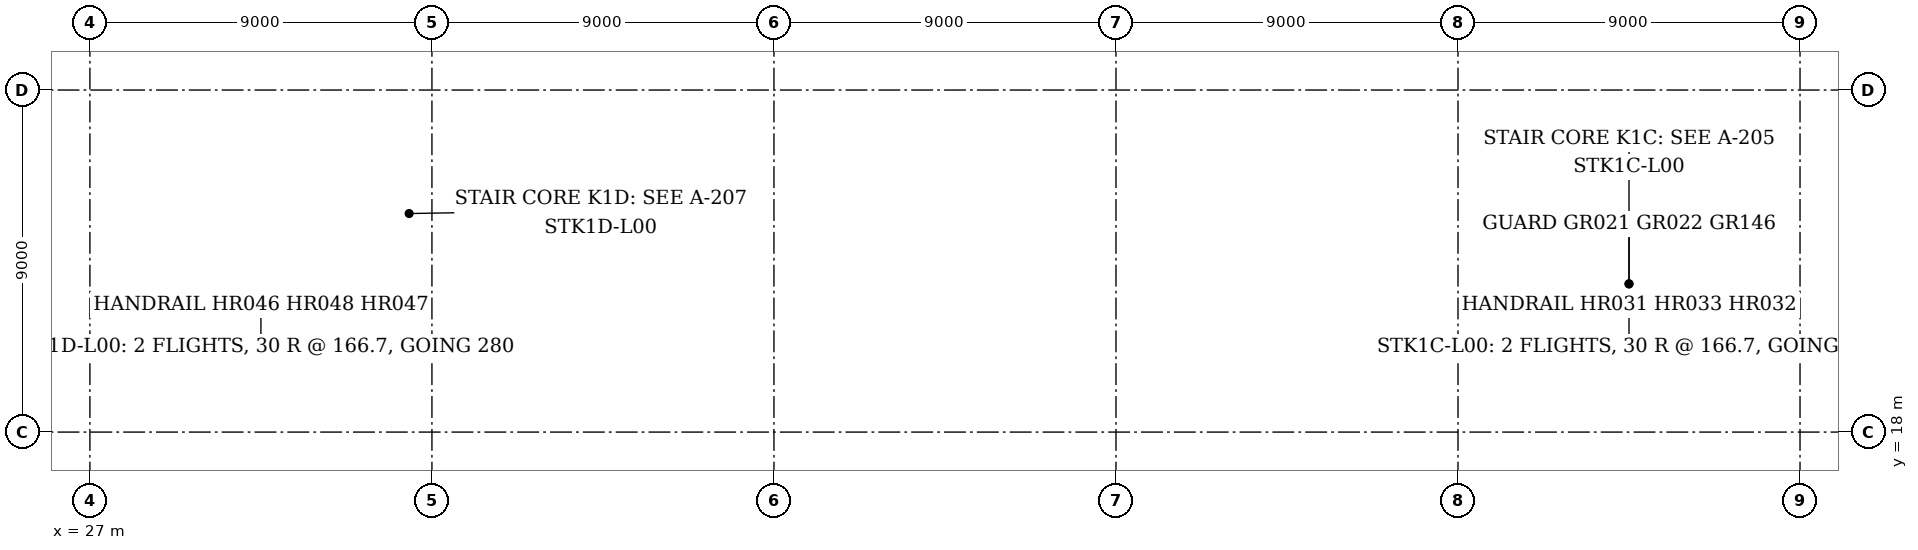
"""IFC4 building model, lengths in metres.
Left out: names, types, materials, properties, quantities, classifications, styles, units other than length and angle.
Written with IfcOpenShell. Run it as: python <this file> out.ifc"""

import sys

from ifc_helpers import new_model, si_unit, direction, frame, frame_2d, origin, origin_2d, place, context, subcontext, project, spatial, rectangle, hollow_rectangle, i_section, extrude, element, fill, save


model = new_model("IFC4")
c1 = context("Model", 3, precision=1e-05, world=origin(), true_north=direction((0.0, 1.0)))
c2 = subcontext(c1, "Body", "Model", "MODEL_VIEW")
j1 = project(units=[si_unit("LENGTHUNIT", "METRE"), si_unit("PLANEANGLEUNIT", "RADIAN")], contexts=[c1])
p1 = place(None, origin())
s1 = spatial("IfcSite", under=j1, at=p1, CompositionType="ELEMENT")
p2 = place(p1, origin())
s2 = spatial("IfcBuilding", under=s1, at=p2, CompositionType="ELEMENT")
p3 = place(p2, origin())
s3 = spatial("IfcBuildingStorey", under=s2, at=p3, CompositionType="ELEMENT", Elevation=0.0)
p4 = place(p3, frame((45.0, 18.0, 0.0), z_axis=(0.0, 0.0, 1.0), x_axis=(1.0, 0.0, 0.0)))
e1 = element("IfcColumn", 1, at=p4, inside=s3, PredefinedType="COLUMN", context=c2, shape_type="SweptSolid", body=[
    extrude(hollow_rectangle(XDim=0.3, YDim=0.3, WallThickness=0.016, InnerFilletRadius=0.024, OuterFilletRadius=0.04, at=origin_2d()), origin(), (0.0, 0.0, 1.0), 5.0),
])
p5 = place(p3, frame((54.0, 18.0, 0.0), z_axis=(0.0, 0.0, 1.0), x_axis=(1.0, 0.0, 0.0)))
e2 = element("IfcColumn", 2, at=p5, inside=s3, PredefinedType="COLUMN", context=c2, shape_type="SweptSolid", body=[
    extrude(i_section(OverallWidth=0.5, OverallDepth=0.48, WebThickness=0.04, FlangeThickness=0.04, at=origin_2d()), origin(), (0.0, 0.0, 1.0), 5.0),
])
p6 = place(p3, frame((27.0, 27.0, 0.0), z_axis=(0.0, 0.0, 1.0), x_axis=(1.0, 0.0, 0.0)))
e3 = element("IfcColumn", 3, at=p6, inside=s3, PredefinedType="COLUMN", context=c2, shape_type="SweptSolid", body=[
    extrude(hollow_rectangle(XDim=0.3, YDim=0.3, WallThickness=0.016, InnerFilletRadius=0.024, OuterFilletRadius=0.04, at=origin_2d()), origin(), (0.0, 0.0, 1.0), 5.0),
])
p7 = place(p3, frame((36.0, 27.0, 0.0), z_axis=(0.0, 0.0, 1.0), x_axis=(1.0, 0.0, 0.0)))
e4 = element("IfcColumn", 4, at=p7, inside=s3, PredefinedType="COLUMN", context=c2, shape_type="SweptSolid", body=[
    extrude(i_section(OverallWidth=0.5, OverallDepth=0.48, WebThickness=0.04, FlangeThickness=0.04, at=origin_2d()), origin(), (0.0, 0.0, 1.0), 5.0),
])
p8 = place(p3, frame((45.0, 27.0, 0.0), z_axis=(0.0, 0.0, 1.0), x_axis=(1.0, 0.0, 0.0)))
e5 = element("IfcColumn", 5, at=p8, inside=s3, PredefinedType="COLUMN", context=c2, shape_type="SweptSolid", body=[
    extrude(i_section(OverallWidth=0.309, OverallDepth=0.321, WebThickness=0.014, FlangeThickness=0.022, FilletRadius=0.017, at=origin_2d()), origin(), (0.0, 0.0, 1.0), 5.0),
])
p9 = place(p3, frame((54.0, 27.0, 0.0), z_axis=(0.0, 0.0, 1.0), x_axis=(1.0, 0.0, 0.0)))
e6 = element("IfcColumn", 6, at=p9, inside=s3, PredefinedType="COLUMN", context=c2, shape_type="SweptSolid", body=[
    extrude(i_section(OverallWidth=0.5, OverallDepth=0.48, WebThickness=0.04, FlangeThickness=0.04, at=origin_2d()), origin(), (0.0, 0.0, 1.0), 5.0),
])
for number, where, z_axis, x_axis in (
    (7, (63.0, 27.0, 0.0), (0.0, 0.0, 1.0), (1.0, 0.0, 0.0)),
    (8, (27.0, 18.0, 0.0), (0.0, 0.0, 1.0), (1.0, 0.0, 0.0)),
):
    element("IfcColumn", number, at=place(p3, frame(where, z_axis=z_axis, x_axis=x_axis)), inside=s3, PredefinedType="COLUMN", context=c2, shape_type="SweptSolid", body=[
        extrude(i_section(OverallWidth=0.311, OverallDepth=0.327, WebThickness=0.016, FlangeThickness=0.025, FilletRadius=0.017, at=origin_2d()), origin(), (0.0, 0.0, 1.0), 5.0),
    ])
p10 = place(p3, frame((72.1, 9.0, 0.0), z_axis=(0.0, 0.0, 1.0), x_axis=(0.0, 1.0, 0.0)))
e9 = element("IfcWall", 9, at=p10, inside=s3, PredefinedType="SOLIDWALL", context=c2, shape_type="SweptSolid", body=[
    extrude(rectangle(XDim=9.0, YDim=0.32, at=frame_2d((4.5, 0.0))), origin(), (0.0, 0.0, 1.0), 4.835),
])
p11 = place(p3, frame((27.09, 22.5, 0.0), z_axis=(0.0, 0.0, 1.0), x_axis=(0.0, 1.0, 0.0)))
e10 = element("IfcWall", 10, at=p11, inside=s3, PredefinedType="SOLIDWALL", context=c2, shape_type="SweptSolid", body=[
    extrude(rectangle(XDim=4.35, YDim=0.3, at=frame_2d((2.175, 0.0))), origin(), (0.0, 0.0, 1.0), 4.378),
])
p12 = place(p3, frame((46.6, 18.15, 0.0), z_axis=(0.0, 0.0, 1.0), x_axis=(1.0, 0.0, 0.0)))
e11 = element("IfcWall", 11, at=p12, inside=s3, PredefinedType="SOLIDWALL", context=c2, shape_type="SweptSolid", body=[
    extrude(rectangle(XDim=5.7, YDim=0.2, at=frame_2d((2.85, 0.0))), origin(), (0.0, 0.0, 1.0), 4.835),
])
p13 = place(p12, frame((0.3, 0.0, 0.0)))
e12 = element("IfcOpeningElement", 12, at=p13, cuts=e11, PredefinedType="OPENING", context=c2, shape_type="SweptSolid", body=[
    extrude(rectangle(XDim=2.4, YDim=2.4, at=frame_2d((1.2, 1.2))), frame((0.0, 0.11, 0.0), z_axis=(0.0, -1.0, 0.0), x_axis=(1.0, 0.0, 0.0)), (0.0, 0.0, 1.0), 0.22),
])
p14 = place(p12, frame((3.0, 0.0, 0.0)))
e13 = element("IfcOpeningElement", 13, at=p14, cuts=e11, PredefinedType="OPENING", context=c2, shape_type="SweptSolid", body=[
    extrude(rectangle(XDim=2.4, YDim=2.4, at=frame_2d((1.2, 1.2))), frame((0.0, 0.11, 0.0), z_axis=(0.0, -1.0, 0.0), x_axis=(1.0, 0.0, 0.0)), (0.0, 0.0, 1.0), 0.22),
])
p15 = place(p3, frame((63.0, 18.15, 0.0), z_axis=(0.0, 0.0, 1.0), x_axis=(1.0, 0.0, 0.0)))
e14 = element("IfcWall", 14, at=p15, inside=s3, PredefinedType="SOLIDWALL", context=c2, shape_type="SweptSolid", body=[
    extrude(rectangle(XDim=9.0, YDim=0.3, at=frame_2d((4.5, 0.0))), origin(), (0.0, 0.0, 1.0), 5.0),
])
p16 = place(p15, frame((3.65, 0.0, 0.0)))
e15 = element("IfcOpeningElement", 15, at=p16, cuts=e14, PredefinedType="OPENING", context=c2, shape_type="SweptSolid", body=[
    extrude(rectangle(XDim=1.8, YDim=2.1, at=frame_2d((0.9, 1.05))), frame((0.0, 0.16, 0.0), z_axis=(0.0, -1.0, 0.0), x_axis=(1.0, 0.0, 0.0)), (0.0, 0.0, 1.0), 0.32),
])
p17 = place(p3, frame((71.85, 18.3, 0.0), z_axis=(0.0, 0.0, 1.0), x_axis=(0.0, 1.0, 0.0)))
e16 = element("IfcWall", 16, at=p17, inside=s3, PredefinedType="SOLIDWALL", context=c2, shape_type="SweptSolid", body=[
    extrude(rectangle(XDim=3.9, YDim=0.3, at=frame_2d((1.95, 0.0))), origin(), (0.0, 0.0, 1.0), 5.0),
])
p18 = place(p3, frame((63.0, 22.35, 0.0), z_axis=(0.0, 0.0, 1.0), x_axis=(1.0, 0.0, 0.0)))
e17 = element("IfcWall", 17, at=p18, inside=s3, PredefinedType="SOLIDWALL", context=c2, shape_type="SweptSolid", body=[
    extrude(rectangle(XDim=9.0, YDim=0.3, at=frame_2d((4.5, 0.0))), origin(), (0.0, 0.0, 1.0), 5.0),
])
p19 = place(p3, frame((63.15, 18.3, 0.0), z_axis=(0.0, 0.0, 1.0), x_axis=(0.0, 1.0, 0.0)))
e18 = element("IfcWall", 18, at=p19, inside=s3, PredefinedType="SOLIDWALL", context=c2, shape_type="SweptSolid", body=[
    extrude(rectangle(XDim=3.9, YDim=0.3, at=frame_2d((1.95, 0.0))), origin(), (0.0, 0.0, 1.0), 5.0),
])
p20 = place(p19, frame((1.05, 0.0, 0.0)))
e19 = element("IfcOpeningElement", 19, at=p20, cuts=e18, PredefinedType="OPENING", context=c2, shape_type="SweptSolid", body=[
    extrude(rectangle(XDim=1.8, YDim=2.1, at=frame_2d((0.9, 1.05))), frame((0.0, 0.16, 0.0), z_axis=(0.0, -1.0, 0.0), x_axis=(1.0, 0.0, 0.0)), (0.0, 0.0, 1.0), 0.32),
])
p21 = place(p3, frame((27.0, 18.15, 0.0), z_axis=(0.0, 0.0, 1.0), x_axis=(1.0, 0.0, 0.0)))
e20 = element("IfcWall", 20, at=p21, inside=s3, PredefinedType="SOLIDWALL", context=c2, shape_type="SweptSolid", body=[
    extrude(rectangle(XDim=9.0, YDim=0.3, at=frame_2d((4.5, 0.0))), origin(), (0.0, 0.0, 1.0), 5.0),
])
p22 = place(p21, frame((3.55, 0.0, 0.0)))
e21 = element("IfcOpeningElement", 21, at=p22, cuts=e20, PredefinedType="OPENING", context=c2, shape_type="SweptSolid", body=[
    extrude(rectangle(XDim=1.8, YDim=2.1, at=frame_2d((0.9, 1.05))), frame((0.0, 0.16, 0.0), z_axis=(0.0, -1.0, 0.0), x_axis=(1.0, 0.0, 0.0)), (0.0, 0.0, 1.0), 0.32),
])
p23 = place(p3, frame((35.85, 18.3, 0.0), z_axis=(0.0, 0.0, 1.0), x_axis=(0.0, 1.0, 0.0)))
e22 = element("IfcWall", 22, at=p23, inside=s3, PredefinedType="SOLIDWALL", context=c2, shape_type="SweptSolid", body=[
    extrude(rectangle(XDim=3.9, YDim=0.3, at=frame_2d((1.95, 0.0))), origin(), (0.0, 0.0, 1.0), 5.0),
])
p24 = place(p23, frame((1.05, 0.0, 0.0)))
e23 = element("IfcOpeningElement", 23, at=p24, cuts=e22, PredefinedType="OPENING", context=c2, shape_type="SweptSolid", body=[
    extrude(rectangle(XDim=1.8, YDim=2.1, at=frame_2d((0.9, 1.05))), frame((0.0, 0.16, 0.0), z_axis=(0.0, -1.0, 0.0), x_axis=(1.0, 0.0, 0.0)), (0.0, 0.0, 1.0), 0.32),
])
p25 = place(p3, frame((27.0, 22.35, 0.0), z_axis=(0.0, 0.0, 1.0), x_axis=(1.0, 0.0, 0.0)))
e24 = element("IfcWall", 24, at=p25, inside=s3, PredefinedType="SOLIDWALL", context=c2, shape_type="SweptSolid", body=[
    extrude(rectangle(XDim=9.0, YDim=0.3, at=frame_2d((4.5, 0.0))), origin(), (0.0, 0.0, 1.0), 5.0),
])
p26 = place(p3, frame((27.15, 18.3, 0.0), z_axis=(0.0, 0.0, 1.0), x_axis=(0.0, 1.0, 0.0)))
e25 = element("IfcWall", 25, at=p26, inside=s3, PredefinedType="SOLIDWALL", context=c2, shape_type="SweptSolid", body=[
    extrude(rectangle(XDim=3.9, YDim=0.3, at=frame_2d((1.95, 0.0))), origin(), (0.0, 0.0, 1.0), 5.0),
])
p27 = place(p3, frame((72.0, 27.15, 0.0), z_axis=(0.0, 0.0, 1.0), x_axis=(1.0, 0.0, 0.0)))
e26 = element("IfcWall", 26, at=p27, inside=s3, PredefinedType="SOLIDWALL", context=c2, shape_type="SweptSolid", body=[
    extrude(rectangle(XDim=4.5, YDim=0.3, at=frame_2d((2.25, 0.0))), origin(), (0.0, 0.0, 1.0), 5.0),
])
p28 = place(p3, frame((72.15, 27.3, 0.0), z_axis=(0.0, 0.0, 1.0), x_axis=(0.0, 1.0, 0.0)))
e27 = element("IfcWall", 27, at=p28, inside=s3, PredefinedType="SOLIDWALL", context=c2, shape_type="SweptSolid", body=[
    extrude(rectangle(XDim=8.4, YDim=0.3, at=frame_2d((4.2, 0.0))), origin(), (0.0, 0.0, 1.0), 5.0),
])
p29 = place(p28, frame((0.45, 0.0, 0.0)))
e28 = element("IfcOpeningElement", 28, at=p29, cuts=e27, PredefinedType="OPENING", context=c2, shape_type="SweptSolid", body=[
    extrude(rectangle(XDim=1.4, YDim=2.1, at=frame_2d((0.7, 1.05))), frame((0.0, 0.16, 0.0), z_axis=(0.0, -1.0, 0.0), x_axis=(1.0, 0.0, 0.0)), (0.0, 0.0, 1.0), 0.32),
])
p30 = place(p3, frame((39.048, 27.1, 0.0), z_axis=(0.0, 0.0, 1.0), x_axis=(1.0, 0.0, 0.0)))
e29 = element("IfcWall", 29, at=p30, inside=s3, PredefinedType="PARTITIONING", context=c2, shape_type="SweptSolid", body=[
    extrude(rectangle(XDim=3.0, YDim=0.2, at=frame_2d((1.5, 0.0))), origin(), (0.0, 0.0, 1.0), 4.228),
])
p31 = place(p30, frame((0.55, 0.0, 0.0)))
e30 = element("IfcOpeningElement", 30, at=p31, cuts=e29, PredefinedType="OPENING", context=c2, shape_type="SweptSolid", body=[
    extrude(rectangle(XDim=1.8, YDim=2.1, at=frame_2d((0.9, 1.05))), frame((0.0, 0.11, 0.0), z_axis=(0.0, -1.0, 0.0), x_axis=(1.0, 0.0, 0.0)), (0.0, 0.0, 1.0), 0.22),
])
for number, where, z_axis, x_axis in (
    (31, (47.952, 27.1, 0.0), (0.0, 0.0, 1.0), (1.0, 0.0, 0.0)),
    (32, (57.047, 27.1, 0.0), (0.0, 0.0, 1.0), (1.0, 0.0, 0.0)),
):
    element("IfcWall", number, at=place(p3, frame(where, z_axis=z_axis, x_axis=x_axis)), inside=s3, PredefinedType="PARTITIONING", context=c2, shape_type="SweptSolid", body=[
        extrude(rectangle(XDim=3.0, YDim=0.2, at=frame_2d((1.5, 0.0))), origin(), (0.0, 0.0, 1.0), 4.228),
    ])
p32 = place(p13, frame((2.4, 0.0, 0.0), z_axis=(0.0, 0.0, 1.0), x_axis=(-1.0, 0.0, 0.0)))
e33 = element("IfcDoor", 33, at=p32, inside=s3, OperationType="DOUBLE_DOOR_SINGLE_SWING", PredefinedType="DOOR", context=c2, shape_type="SweptSolid", body=[
    extrude(rectangle(XDim=2.4, YDim=2.4, at=frame_2d((1.2, 1.2))), frame((0.0, 0.025, 0.0), z_axis=(0.0, -1.0, 0.0), x_axis=(1.0, 0.0, 0.0)), (0.0, 0.0, 1.0), 0.05),
])
fill(e12, e33)
p33 = place(p14, frame((2.4, 0.0, 0.0), z_axis=(0.0, 0.0, 1.0), x_axis=(-1.0, 0.0, 0.0)))
e34 = element("IfcDoor", 34, at=p33, inside=s3, OperationType="DOUBLE_DOOR_SINGLE_SWING", PredefinedType="DOOR", context=c2, shape_type="SweptSolid", body=[
    extrude(rectangle(XDim=2.4, YDim=2.4, at=frame_2d((1.2, 1.2))), frame((0.0, 0.025, 0.0), z_axis=(0.0, -1.0, 0.0), x_axis=(1.0, 0.0, 0.0)), (0.0, 0.0, 1.0), 0.05),
])
fill(e13, e34)
p34 = place(p16, frame((1.8, 0.0, 0.0), z_axis=(0.0, 0.0, 1.0), x_axis=(-1.0, 0.0, 0.0)))
e35 = element("IfcDoor", 35, at=p34, inside=s3, OperationType="DOUBLE_DOOR_SINGLE_SWING", PredefinedType="DOOR", context=c2, shape_type="SweptSolid", body=[
    extrude(rectangle(XDim=1.8, YDim=2.1, at=frame_2d((0.9, 1.05))), frame((0.0, 0.025, 0.0), z_axis=(0.0, -1.0, 0.0), x_axis=(1.0, 0.0, 0.0)), (0.0, 0.0, 1.0), 0.05),
])
fill(e15, e35)
p35 = place(p20, frame((1.8, 0.0, 0.0), z_axis=(0.0, 0.0, 1.0), x_axis=(-1.0, 0.0, 0.0)))
e36 = element("IfcDoor", 36, at=p35, inside=s3, OperationType="DOUBLE_DOOR_SINGLE_SWING", PredefinedType="DOOR", context=c2, shape_type="SweptSolid", body=[
    extrude(rectangle(XDim=1.8, YDim=2.1, at=frame_2d((0.9, 1.05))), frame((0.0, 0.025, 0.0), z_axis=(0.0, -1.0, 0.0), x_axis=(1.0, 0.0, 0.0)), (0.0, 0.0, 1.0), 0.05),
])
fill(e19, e36)
p36 = place(p22, frame((1.8, 0.0, 0.0), z_axis=(0.0, 0.0, 1.0), x_axis=(-1.0, 0.0, 0.0)))
e37 = element("IfcDoor", 37, at=p36, inside=s3, OperationType="DOUBLE_DOOR_SINGLE_SWING", PredefinedType="DOOR", context=c2, shape_type="SweptSolid", body=[
    extrude(rectangle(XDim=1.8, YDim=2.1, at=frame_2d((0.9, 1.05))), frame((0.0, 0.025, 0.0), z_axis=(0.0, -1.0, 0.0), x_axis=(1.0, 0.0, 0.0)), (0.0, 0.0, 1.0), 0.05),
])
fill(e21, e37)
p37 = place(p24, origin())
e38 = element("IfcDoor", 38, at=p37, inside=s3, OperationType="DOUBLE_DOOR_SINGLE_SWING", PredefinedType="DOOR", context=c2, shape_type="SweptSolid", body=[
    extrude(rectangle(XDim=1.8, YDim=2.1, at=frame_2d((0.9, 1.05))), frame((0.0, 0.025, 0.0), z_axis=(0.0, -1.0, 0.0), x_axis=(1.0, 0.0, 0.0)), (0.0, 0.0, 1.0), 0.05),
])
fill(e23, e38)
p38 = place(p29, origin())
e39 = element("IfcDoor", 39, at=p38, inside=s3, OperationType="SLIDING_TO_RIGHT", PredefinedType="DOOR", context=c2, shape_type="SweptSolid", body=[
    extrude(rectangle(XDim=1.4, YDim=2.1, at=frame_2d((0.7, 1.05))), frame((0.0, 0.025, 0.0), z_axis=(0.0, -1.0, 0.0), x_axis=(1.0, 0.0, 0.0)), (0.0, 0.0, 1.0), 0.05),
])
fill(e28, e39)
p39 = place(p31, frame((1.8, 0.0, 0.0), z_axis=(0.0, 0.0, 1.0), x_axis=(-1.0, 0.0, 0.0)))
e40 = element("IfcDoor", 40, at=p39, inside=s3, OperationType="DOUBLE_DOOR_SINGLE_SWING", PredefinedType="DOOR", context=c2, shape_type="SweptSolid", body=[
    extrude(rectangle(XDim=1.8, YDim=2.1, at=frame_2d((0.9, 1.05))), frame((0.0, 0.025, 0.0), z_axis=(0.0, -1.0, 0.0), x_axis=(1.0, 0.0, 0.0)), (0.0, 0.0, 1.0), 0.05),
])
fill(e30, e40)
save(model, sys.argv[1])
